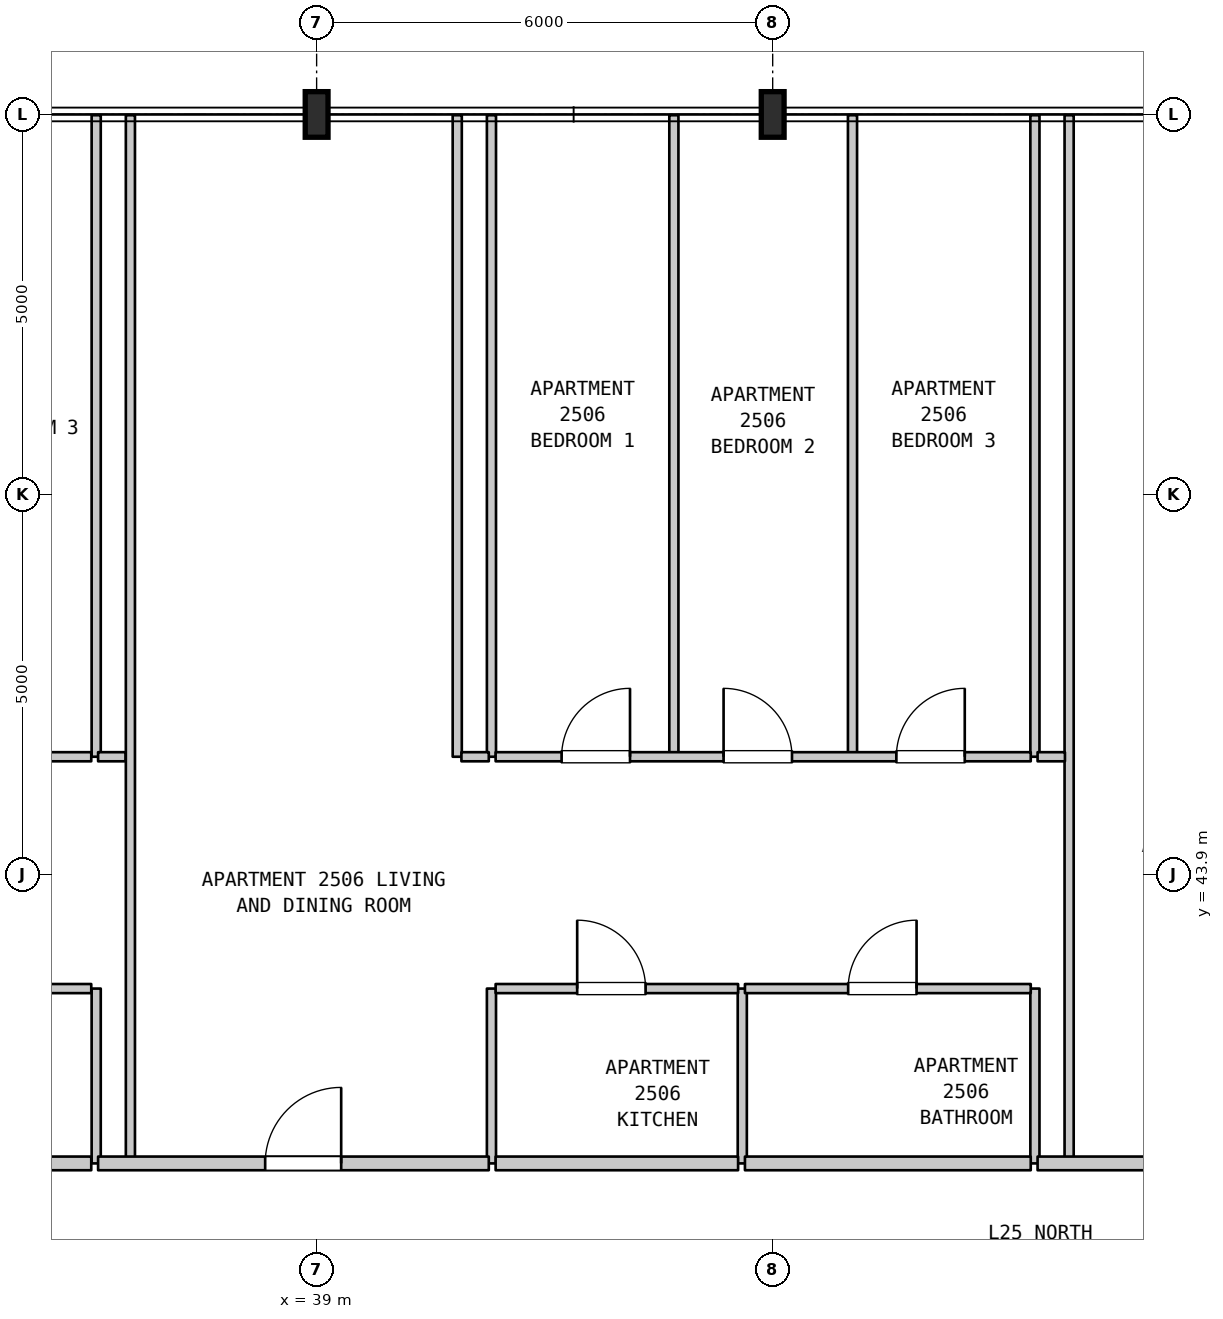
"""IFC4 building model, lengths in metres.
Left out: names, types, materials, properties, quantities, classifications, styles, units other than length and angle.
Written with IfcOpenShell. Run it as: python <this file> out.ifc"""

import sys

from ifc_helpers import new_model, si_unit, direction, frame, frame_2d, origin, origin_2d, place, context, subcontext, project, spatial, rectangle, i_section, extrude, element, fill, save


model = new_model("IFC4")
c1 = context("Model", 3, precision=1e-05, world=origin(), true_north=direction((0.0, 1.0)))
c2 = subcontext(c1, "Body", "Model", "MODEL_VIEW")
j1 = project(units=[si_unit("LENGTHUNIT", "METRE"), si_unit("PLANEANGLEUNIT", "RADIAN")], contexts=[c1])
p1 = place(None, origin())
s1 = spatial("IfcSite", under=j1, at=p1, CompositionType="ELEMENT")
p2 = place(p1, origin())
s2 = spatial("IfcBuilding", under=s1, at=p2, CompositionType="ELEMENT")
p3 = place(p2, frame((0.0, 0.0, 105.7)))
s3 = spatial("IfcBuildingStorey", under=s2, at=p3, CompositionType="ELEMENT", Elevation=105.7)
for number, where, z_axis, x_axis in (
    (1, (39.0, 53.9, 0.0), (0.0, 0.0, 1.0), (1.0, 0.0, 0.0)),
    (2, (45.0, 53.9, 0.0), (0.0, 0.0, 1.0), (1.0, 0.0, 0.0)),
):
    element("IfcColumn", number, at=place(p3, frame(where, z_axis=z_axis, x_axis=x_axis)), inside=s3, PredefinedType="COLUMN", context=c2, shape_type="SweptSolid", body=[
        extrude(i_section(OverallWidth=0.3, OverallDepth=0.6, WebThickness=0.015, FlangeThickness=0.03, FilletRadius=0.027, at=origin_2d()), origin(), (0.0, 0.0, 1.0), 3.7),
    ])
p4 = place(p3, frame((36.1, 40.1, 0.0), z_axis=(0.0, 0.0, 1.0), x_axis=(0.0, 1.0, 0.0)))
e3 = element("IfcWall", 3, at=p4, inside=s3, PredefinedType="PARTITIONING", context=c2, shape_type="SweptSolid", body=[
    extrude(rectangle(XDim=2.3, YDim=0.12, at=frame_2d((1.15, 0.0))), origin(), (0.0, 0.0, 1.0), 3.385),
])
p5 = place(p3, frame((36.1, 45.45, 0.0), z_axis=(0.0, 0.0, 1.0), x_axis=(0.0, 1.0, 0.0)))
e4 = element("IfcWall", 4, at=p5, inside=s3, PredefinedType="PARTITIONING", context=c2, shape_type="SweptSolid", body=[
    extrude(rectangle(XDim=8.44, YDim=0.12, at=frame_2d((4.22, 0.0))), origin(), (0.0, 0.0, 1.0), 3.385),
])
p6 = place(p3, frame((36.55, 40.1, 0.0), z_axis=(0.0, 0.0, 1.0), x_axis=(0.0, 1.0, 0.0)))
e5 = element("IfcWall", 5, at=p6, inside=s3, PredefinedType="PARTITIONING", context=c2, shape_type="SweptSolid", body=[
    extrude(rectangle(XDim=13.79, YDim=0.12, at=frame_2d((6.895, 0.0))), origin(), (0.0, 0.0, 1.0), 3.385),
])
p7 = place(p3, frame((40.85, 45.45, 0.0), z_axis=(0.0, 0.0, 1.0), x_axis=(0.0, 1.0, 0.0)))
e6 = element("IfcWall", 6, at=p7, inside=s3, PredefinedType="PARTITIONING", context=c2, shape_type="SweptSolid", body=[
    extrude(rectangle(XDim=8.44, YDim=0.12, at=frame_2d((4.22, 0.0))), origin(), (0.0, 0.0, 1.0), 3.385),
])
p8 = place(p3, frame((41.3, 40.1, 0.0), z_axis=(0.0, 0.0, 1.0), x_axis=(0.0, 1.0, 0.0)))
e7 = element("IfcWall", 7, at=p8, inside=s3, PredefinedType="PARTITIONING", context=c2, shape_type="SweptSolid", body=[
    extrude(rectangle(XDim=2.3, YDim=0.12, at=frame_2d((1.15, 0.0))), origin(), (0.0, 0.0, 1.0), 3.385),
])
for number, where, z_axis, x_axis in (
    (8, (41.3, 45.45, 0.0), (0.0, 0.0, 1.0), (0.0, 1.0, 0.0)),
    (9, (43.7, 45.45, 0.0), (0.0, 0.0, 1.0), (0.0, 1.0, 0.0)),
):
    element("IfcWall", number, at=place(p3, frame(where, z_axis=z_axis, x_axis=x_axis)), inside=s3, PredefinedType="PARTITIONING", context=c2, shape_type="SweptSolid", body=[
        extrude(rectangle(XDim=8.44, YDim=0.12, at=frame_2d((4.22, 0.0))), origin(), (0.0, 0.0, 1.0), 3.385),
    ])
p9 = place(p3, frame((44.6, 40.1, 0.0), z_axis=(0.0, 0.0, 1.0), x_axis=(0.0, 1.0, 0.0)))
e10 = element("IfcWall", 10, at=p9, inside=s3, PredefinedType="PARTITIONING", context=c2, shape_type="SweptSolid", body=[
    extrude(rectangle(XDim=2.3, YDim=0.12, at=frame_2d((1.15, 0.0))), origin(), (0.0, 0.0, 1.0), 3.385),
])
p10 = place(p3, frame((46.05, 45.45, 0.0), z_axis=(0.0, 0.0, 1.0), x_axis=(0.0, 1.0, 0.0)))
e11 = element("IfcWall", 11, at=p10, inside=s3, PredefinedType="PARTITIONING", context=c2, shape_type="SweptSolid", body=[
    extrude(rectangle(XDim=8.44, YDim=0.12, at=frame_2d((4.22, 0.0))), origin(), (0.0, 0.0, 1.0), 3.385),
])
p11 = place(p3, frame((48.45, 40.1, 0.0), z_axis=(0.0, 0.0, 1.0), x_axis=(0.0, 1.0, 0.0)))
e12 = element("IfcWall", 12, at=p11, inside=s3, PredefinedType="PARTITIONING", context=c2, shape_type="SweptSolid", body=[
    extrude(rectangle(XDim=2.3, YDim=0.12, at=frame_2d((1.15, 0.0))), origin(), (0.0, 0.0, 1.0), 3.385),
])
p12 = place(p3, frame((48.45, 45.45, 0.0), z_axis=(0.0, 0.0, 1.0), x_axis=(0.0, 1.0, 0.0)))
e13 = element("IfcWall", 13, at=p12, inside=s3, PredefinedType="PARTITIONING", context=c2, shape_type="SweptSolid", body=[
    extrude(rectangle(XDim=8.44, YDim=0.12, at=frame_2d((4.22, 0.0))), origin(), (0.0, 0.0, 1.0), 3.385),
])
p13 = place(p3, frame((48.9, 40.1, 0.0), z_axis=(0.0, 0.0, 1.0), x_axis=(0.0, 1.0, 0.0)))
e14 = element("IfcWall", 14, at=p13, inside=s3, PredefinedType="PARTITIONING", context=c2, shape_type="SweptSolid", body=[
    extrude(rectangle(XDim=13.79, YDim=0.12, at=frame_2d((6.895, 0.0))), origin(), (0.0, 0.0, 1.0), 3.385),
])
p14 = place(p3, frame((31.913, 40.1, 0.0), z_axis=(0.0, 0.0, 1.0), x_axis=(1.0, 0.0, 0.0)))
e15 = element("IfcWall", 15, at=p14, inside=s3, PredefinedType="STANDARD", context=c2, shape_type="SweptSolid", body=[
    extrude(rectangle(XDim=4.122, YDim=0.18, at=frame_2d((2.061, 0.0))), origin(), (0.0, 0.0, 1.0), 3.385),
])
p15 = place(p3, frame((36.125, 40.1, 0.0), z_axis=(0.0, 0.0, 1.0), x_axis=(1.0, 0.0, 0.0)))
e16 = element("IfcWall", 16, at=p15, inside=s3, PredefinedType="STANDARD", context=c2, shape_type="SweptSolid", body=[
    extrude(rectangle(XDim=5.14, YDim=0.18, at=frame_2d((2.57, 0.0))), origin(), (0.0, 0.0, 1.0), 3.385),
])
p16 = place(p15, frame((2.198, 0.0, 0.0)))
e17 = element("IfcOpeningElement", 17, at=p16, cuts=e16, PredefinedType="OPENING", context=c2, shape_type="SweptSolid", body=[
    extrude(rectangle(XDim=1.0, YDim=2.15, at=frame_2d((0.5, 1.075))), frame((0.0, 0.1, 0.0), z_axis=(0.0, -1.0, 0.0), x_axis=(1.0, 0.0, 0.0)), (0.0, 0.0, 1.0), 0.2),
])
p17 = place(p3, frame((41.355, 40.1, 0.0), z_axis=(0.0, 0.0, 1.0), x_axis=(1.0, 0.0, 0.0)))
e18 = element("IfcWall", 18, at=p17, inside=s3, PredefinedType="STANDARD", context=c2, shape_type="SweptSolid", body=[
    extrude(rectangle(XDim=3.19, YDim=0.18, at=frame_2d((1.595, 0.0))), origin(), (0.0, 0.0, 1.0), 3.385),
])
p18 = place(p3, frame((44.635, 40.1, 0.0), z_axis=(0.0, 0.0, 1.0), x_axis=(1.0, 0.0, 0.0)))
e19 = element("IfcWall", 19, at=p18, inside=s3, PredefinedType="STANDARD", context=c2, shape_type="SweptSolid", body=[
    extrude(rectangle(XDim=3.76, YDim=0.18, at=frame_2d((1.88, 0.0))), origin(), (0.0, 0.0, 1.0), 3.385),
])
p19 = place(p3, frame((48.485, 40.1, 0.0), z_axis=(0.0, 0.0, 1.0), x_axis=(1.0, 0.0, 0.0)))
e20 = element("IfcWall", 20, at=p19, inside=s3, PredefinedType="STANDARD", context=c2, shape_type="SweptSolid", body=[
    extrude(rectangle(XDim=5.1, YDim=0.18, at=frame_2d((2.55, 0.0))), origin(), (0.0, 0.0, 1.0), 3.385),
])
p20 = place(p19, frame((2.179, 0.0, 0.0)))
e21 = element("IfcOpeningElement", 21, at=p20, cuts=e20, PredefinedType="OPENING", context=c2, shape_type="SweptSolid", body=[
    extrude(rectangle(XDim=1.0, YDim=2.15, at=frame_2d((0.5, 1.075))), frame((0.0, 0.1, 0.0), z_axis=(0.0, -1.0, 0.0), x_axis=(1.0, 0.0, 0.0)), (0.0, 0.0, 1.0), 0.2),
])
p21 = place(p3, frame((31.913, 42.4, 0.0), z_axis=(0.0, 0.0, 1.0), x_axis=(1.0, 0.0, 0.0)))
e22 = element("IfcWall", 22, at=p21, inside=s3, PredefinedType="PARTITIONING", context=c2, shape_type="SweptSolid", body=[
    extrude(rectangle(XDim=4.122, YDim=0.12, at=frame_2d((2.061, 0.0))), origin(), (0.0, 0.0, 1.0), 3.385),
])
p22 = place(p21, frame((1.611, 0.0, 0.0)))
e23 = element("IfcOpeningElement", 23, at=p22, cuts=e22, PredefinedType="OPENING", context=c2, shape_type="SweptSolid", body=[
    extrude(rectangle(XDim=0.9, YDim=2.1, at=frame_2d((0.45, 1.05))), frame((0.0, 0.07, 0.0), z_axis=(0.0, -1.0, 0.0), x_axis=(1.0, 0.0, 0.0)), (0.0, 0.0, 1.0), 0.14),
])
p23 = place(p3, frame((41.355, 42.4, 0.0), z_axis=(0.0, 0.0, 1.0), x_axis=(1.0, 0.0, 0.0)))
e24 = element("IfcWall", 24, at=p23, inside=s3, PredefinedType="PARTITIONING", context=c2, shape_type="SweptSolid", body=[
    extrude(rectangle(XDim=3.19, YDim=0.12, at=frame_2d((1.595, 0.0))), origin(), (0.0, 0.0, 1.0), 3.385),
])
p24 = place(p23, frame((1.073, 0.0, 0.0)))
e25 = element("IfcOpeningElement", 25, at=p24, cuts=e24, PredefinedType="OPENING", context=c2, shape_type="SweptSolid", body=[
    extrude(rectangle(XDim=0.9, YDim=2.15, at=frame_2d((0.45, 1.075))), frame((0.0, 0.07, 0.0), z_axis=(0.0, -1.0, 0.0), x_axis=(1.0, 0.0, 0.0)), (0.0, 0.0, 1.0), 0.14),
])
p25 = place(p3, frame((44.635, 42.4, 0.0), z_axis=(0.0, 0.0, 1.0), x_axis=(1.0, 0.0, 0.0)))
e26 = element("IfcWall", 26, at=p25, inside=s3, PredefinedType="PARTITIONING", context=c2, shape_type="SweptSolid", body=[
    extrude(rectangle(XDim=3.76, YDim=0.12, at=frame_2d((1.88, 0.0))), origin(), (0.0, 0.0, 1.0), 3.385),
])
p26 = place(p25, frame((1.358, 0.0, 0.0)))
e27 = element("IfcOpeningElement", 27, at=p26, cuts=e26, PredefinedType="OPENING", context=c2, shape_type="SweptSolid", body=[
    extrude(rectangle(XDim=0.9, YDim=2.1, at=frame_2d((0.45, 1.05))), frame((0.0, 0.07, 0.0), z_axis=(0.0, -1.0, 0.0), x_axis=(1.0, 0.0, 0.0)), (0.0, 0.0, 1.0), 0.14),
])
p27 = place(p3, frame((28.325, 45.45, 0.0), z_axis=(0.0, 0.0, 1.0), x_axis=(1.0, 0.0, 0.0)))
e28 = element("IfcWall", 28, at=p27, inside=s3, PredefinedType="PARTITIONING", context=c2, shape_type="SweptSolid", body=[
    extrude(rectangle(XDim=7.71, YDim=0.12, at=frame_2d((3.855, 0.0))), origin(), (0.0, 0.0, 1.0), 3.385),
])
p28 = place(p27, frame((0.98, 0.0, 0.0)))
e29 = element("IfcOpeningElement", 29, at=p28, cuts=e28, PredefinedType="OPENING", context=c2, shape_type="SweptSolid", body=[
    extrude(rectangle(XDim=0.9, YDim=2.15, at=frame_2d((0.45, 1.075))), frame((0.0, 0.07, 0.0), z_axis=(0.0, -1.0, 0.0), x_axis=(1.0, 0.0, 0.0)), (0.0, 0.0, 1.0), 0.14),
])
p29 = place(p27, frame((3.405, 0.0, 0.0)))
e30 = element("IfcOpeningElement", 30, at=p29, cuts=e28, PredefinedType="OPENING", context=c2, shape_type="SweptSolid", body=[
    extrude(rectangle(XDim=0.9, YDim=2.15, at=frame_2d((0.45, 1.075))), frame((0.0, 0.07, 0.0), z_axis=(0.0, -1.0, 0.0), x_axis=(1.0, 0.0, 0.0)), (0.0, 0.0, 1.0), 0.14),
])
p30 = place(p27, frame((5.83, 0.0, 0.0)))
e31 = element("IfcOpeningElement", 31, at=p30, cuts=e28, PredefinedType="OPENING", context=c2, shape_type="SweptSolid", body=[
    extrude(rectangle(XDim=0.9, YDim=2.15, at=frame_2d((0.45, 1.075))), frame((0.0, 0.07, 0.0), z_axis=(0.0, -1.0, 0.0), x_axis=(1.0, 0.0, 0.0)), (0.0, 0.0, 1.0), 0.14),
])
p31 = place(p3, frame((36.125, 45.45, 0.0), z_axis=(0.0, 0.0, 1.0), x_axis=(1.0, 0.0, 0.0)))
e32 = element("IfcWall", 32, at=p31, inside=s3, PredefinedType="PARTITIONING", context=c2, shape_type="SweptSolid", body=[
    extrude(rectangle(XDim=0.36, YDim=0.12, at=frame_2d((0.18, 0.0))), origin(), (0.0, 0.0, 1.0), 3.385),
])
p32 = place(p3, frame((40.905, 45.45, 0.0), z_axis=(0.0, 0.0, 1.0), x_axis=(1.0, 0.0, 0.0)))
e33 = element("IfcWall", 33, at=p32, inside=s3, PredefinedType="PARTITIONING", context=c2, shape_type="SweptSolid", body=[
    extrude(rectangle(XDim=0.36, YDim=0.12, at=frame_2d((0.18, 0.0))), origin(), (0.0, 0.0, 1.0), 3.385),
])
p33 = place(p3, frame((41.355, 45.45, 0.0), z_axis=(0.0, 0.0, 1.0), x_axis=(1.0, 0.0, 0.0)))
e34 = element("IfcWall", 34, at=p33, inside=s3, PredefinedType="PARTITIONING", context=c2, shape_type="SweptSolid", body=[
    extrude(rectangle(XDim=7.04, YDim=0.12, at=frame_2d((3.52, 0.0))), origin(), (0.0, 0.0, 1.0), 3.385),
])
p34 = place(p33, frame((0.868, 0.0, 0.0)))
e35 = element("IfcOpeningElement", 35, at=p34, cuts=e34, PredefinedType="OPENING", context=c2, shape_type="SweptSolid", body=[
    extrude(rectangle(XDim=0.9, YDim=2.15, at=frame_2d((0.45, 1.075))), frame((0.0, 0.07, 0.0), z_axis=(0.0, -1.0, 0.0), x_axis=(1.0, 0.0, 0.0)), (0.0, 0.0, 1.0), 0.14),
])
p35 = place(p33, frame((2.999, 0.0, 0.0)))
e36 = element("IfcOpeningElement", 36, at=p35, cuts=e34, PredefinedType="OPENING", context=c2, shape_type="SweptSolid", body=[
    extrude(rectangle(XDim=0.9, YDim=2.15, at=frame_2d((0.45, 1.075))), frame((0.0, 0.07, 0.0), z_axis=(0.0, -1.0, 0.0), x_axis=(1.0, 0.0, 0.0)), (0.0, 0.0, 1.0), 0.14),
])
p36 = place(p33, frame((5.272, 0.0, 0.0)))
e37 = element("IfcOpeningElement", 37, at=p36, cuts=e34, PredefinedType="OPENING", context=c2, shape_type="SweptSolid", body=[
    extrude(rectangle(XDim=0.9, YDim=2.15, at=frame_2d((0.45, 1.075))), frame((0.0, 0.07, 0.0), z_axis=(0.0, -1.0, 0.0), x_axis=(1.0, 0.0, 0.0)), (0.0, 0.0, 1.0), 0.14),
])
p37 = place(p3, frame((48.485, 45.45, 0.0), z_axis=(0.0, 0.0, 1.0), x_axis=(1.0, 0.0, 0.0)))
e38 = element("IfcWall", 38, at=p37, inside=s3, PredefinedType="PARTITIONING", context=c2, shape_type="SweptSolid", body=[
    extrude(rectangle(XDim=0.36, YDim=0.12, at=frame_2d((0.18, 0.0))), origin(), (0.0, 0.0, 1.0), 3.385),
])
p38 = place(p16, origin())
e39 = element("IfcDoor", 39, at=p38, inside=s3, OperationType="SINGLE_SWING_RIGHT", PredefinedType="DOOR", context=c2, shape_type="SweptSolid", body=[
    extrude(rectangle(XDim=1.0, YDim=2.15, at=frame_2d((0.5, 1.075))), frame((0.0, 0.025, 0.0), z_axis=(0.0, -1.0, 0.0), x_axis=(1.0, 0.0, 0.0)), (0.0, 0.0, 1.0), 0.05),
])
fill(e17, e39)
p39 = place(p24, origin())
e40 = element("IfcDoor", 40, at=p39, inside=s3, OperationType="SINGLE_SWING_LEFT", PredefinedType="DOOR", context=c2, shape_type="SweptSolid", body=[
    extrude(rectangle(XDim=0.9, YDim=2.15, at=frame_2d((0.45, 1.075))), frame((0.0, 0.025, 0.0), z_axis=(0.0, -1.0, 0.0), x_axis=(1.0, 0.0, 0.0)), (0.0, 0.0, 1.0), 0.05),
])
fill(e25, e40)
p40 = place(p26, origin())
e41 = element("IfcDoor", 41, at=p40, inside=s3, OperationType="SINGLE_SWING_RIGHT", PredefinedType="DOOR", context=c2, shape_type="SweptSolid", body=[
    extrude(rectangle(XDim=0.9, YDim=2.1, at=frame_2d((0.45, 1.05))), frame((0.0, 0.025, 0.0), z_axis=(0.0, -1.0, 0.0), x_axis=(1.0, 0.0, 0.0)), (0.0, 0.0, 1.0), 0.05),
])
fill(e27, e41)
p41 = place(p34, origin())
e42 = element("IfcDoor", 42, at=p41, inside=s3, OperationType="SINGLE_SWING_RIGHT", PredefinedType="DOOR", context=c2, shape_type="SweptSolid", body=[
    extrude(rectangle(XDim=0.9, YDim=2.15, at=frame_2d((0.45, 1.075))), frame((0.0, 0.025, 0.0), z_axis=(0.0, -1.0, 0.0), x_axis=(1.0, 0.0, 0.0)), (0.0, 0.0, 1.0), 0.05),
])
fill(e35, e42)
p42 = place(p35, origin())
e43 = element("IfcDoor", 43, at=p42, inside=s3, OperationType="SINGLE_SWING_LEFT", PredefinedType="DOOR", context=c2, shape_type="SweptSolid", body=[
    extrude(rectangle(XDim=0.9, YDim=2.15, at=frame_2d((0.45, 1.075))), frame((0.0, 0.025, 0.0), z_axis=(0.0, -1.0, 0.0), x_axis=(1.0, 0.0, 0.0)), (0.0, 0.0, 1.0), 0.05),
])
fill(e36, e43)
p43 = place(p36, origin())
e44 = element("IfcDoor", 44, at=p43, inside=s3, OperationType="SINGLE_SWING_RIGHT", PredefinedType="DOOR", context=c2, shape_type="SweptSolid", body=[
    extrude(rectangle(XDim=0.9, YDim=2.15, at=frame_2d((0.45, 1.075))), frame((0.0, 0.025, 0.0), z_axis=(0.0, -1.0, 0.0), x_axis=(1.0, 0.0, 0.0)), (0.0, 0.0, 1.0), 0.05),
])
fill(e37, e44)
save(model, sys.argv[1])
